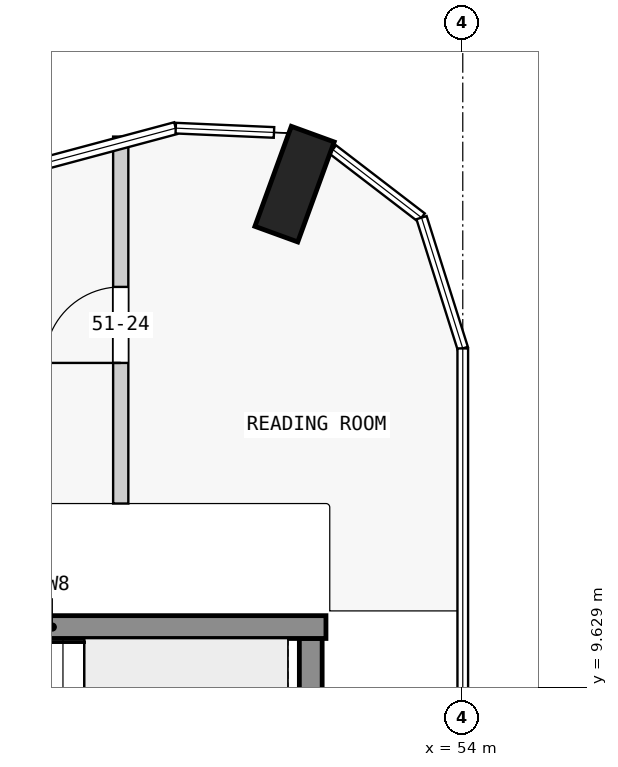
"""IFC4 building model, lengths in metres.
Left out: names, types, materials, properties, quantities, classifications, styles, units other than length and angle.
Written with IfcOpenShell. Run it as: python <this file> out.ifc"""

import sys

from ifc_helpers import new_model, si_unit, direction, frame, frame_2d, origin, origin_2d, place, context, subcontext, project, spatial, rectangle, extrude, element, fill, save


model = new_model("IFC4")
c1 = context("Model", 3, precision=1e-05, world=origin(), true_north=direction((0.0, 1.0)))
c2 = subcontext(c1, "Body", "Model", "MODEL_VIEW")
j1 = project(units=[si_unit("LENGTHUNIT", "METRE"), si_unit("PLANEANGLEUNIT", "RADIAN")], contexts=[c1])
p1 = place(None, origin())
s1 = spatial("IfcSite", under=j1, at=p1, CompositionType="ELEMENT")
p2 = place(p1, origin())
s2 = spatial("IfcBuilding", under=s1, at=p2, CompositionType="ELEMENT")
p3 = place(p2, frame((0.0, 0.0, 197.9)))
s3 = spatial("IfcBuildingStorey", under=s2, at=p3, CompositionType="ELEMENT", Elevation=197.9)
p4 = place(p3, frame((51.787, 16.252, 0.0), z_axis=(0.0, 0.0, 1.0), x_axis=(-0.939664280925, 0.342097996418, 0.0)))
e1 = element("IfcColumn", 1, at=p4, inside=s3, PredefinedType="COLUMN", context=c2, shape_type="SweptSolid", body=[
    extrude(rectangle(XDim=0.6, YDim=1.4, at=origin_2d()), origin(), (0.0, 0.0, 1.0), 3.5),
])
p5 = place(p3, frame((52.0, 7.725, 0.0), z_axis=(0.0, 0.0, 1.0), x_axis=(0.0, 1.0, 0.0)))
e2 = element("IfcWall", 2, at=p5, inside=s3, PredefinedType="SHEAR", context=c2, shape_type="SweptSolid", body=[
    extrude(rectangle(XDim=2.55, YDim=0.3, at=frame_2d((1.275, 0.0))), origin(), (0.0, 0.0, 1.0), 3.5),
])
p6 = place(p3, frame((45.0, 10.425, 0.0), z_axis=(0.0, 0.0, 1.0), x_axis=(1.0, 0.0, 0.0)))
e3 = element("IfcWall", 3, at=p6, inside=s3, PredefinedType="SHEAR", context=c2, shape_type="SweptSolid", body=[
    extrude(rectangle(XDim=7.2, YDim=0.3, at=frame_2d((3.6, 0.0))), origin(), (0.0, 0.0, 1.0), 3.5),
])
p7 = place(p3, frame((49.5, 12.05, 0.0), z_axis=(0.0, 0.0, 1.0), x_axis=(0.0, 1.0, 0.0)))
e4 = element("IfcWall", 4, at=p7, inside=s3, PredefinedType="PARTITIONING", context=c2, shape_type="SweptSolid", body=[
    extrude(rectangle(XDim=4.828, YDim=0.2, at=frame_2d((2.414, 0.0))), origin(), (0.0, 0.0, 1.0), 3.25),
])
p8 = place(p7, frame((1.85, 0.0, 0.0)))
e5 = element("IfcOpeningElement", 5, at=p8, cuts=e4, PredefinedType="OPENING", context=c2, shape_type="SweptSolid", body=[
    extrude(rectangle(XDim=1.0, YDim=2.1, at=frame_2d((0.5, 1.05))), frame((0.0, 0.11, 0.0), z_axis=(0.0, -1.0, 0.0), x_axis=(1.0, 0.0, 0.0)), (0.0, 0.0, 1.0), 0.22),
])
p9 = place(p8, origin())
e6 = element("IfcDoor", 6, at=p9, inside=s3, OperationType="SINGLE_SWING_LEFT", PredefinedType="DOOR", context=c2, shape_type="SweptSolid", body=[
    extrude(rectangle(XDim=1.0, YDim=2.1, at=frame_2d((0.5, 1.05))), frame((0.0, 0.025, 0.0), z_axis=(0.0, -1.0, 0.0), x_axis=(1.0, 0.0, 0.0)), (0.0, 0.0, 1.0), 0.05),
])
fill(e5, e6)
save(model, sys.argv[1])
